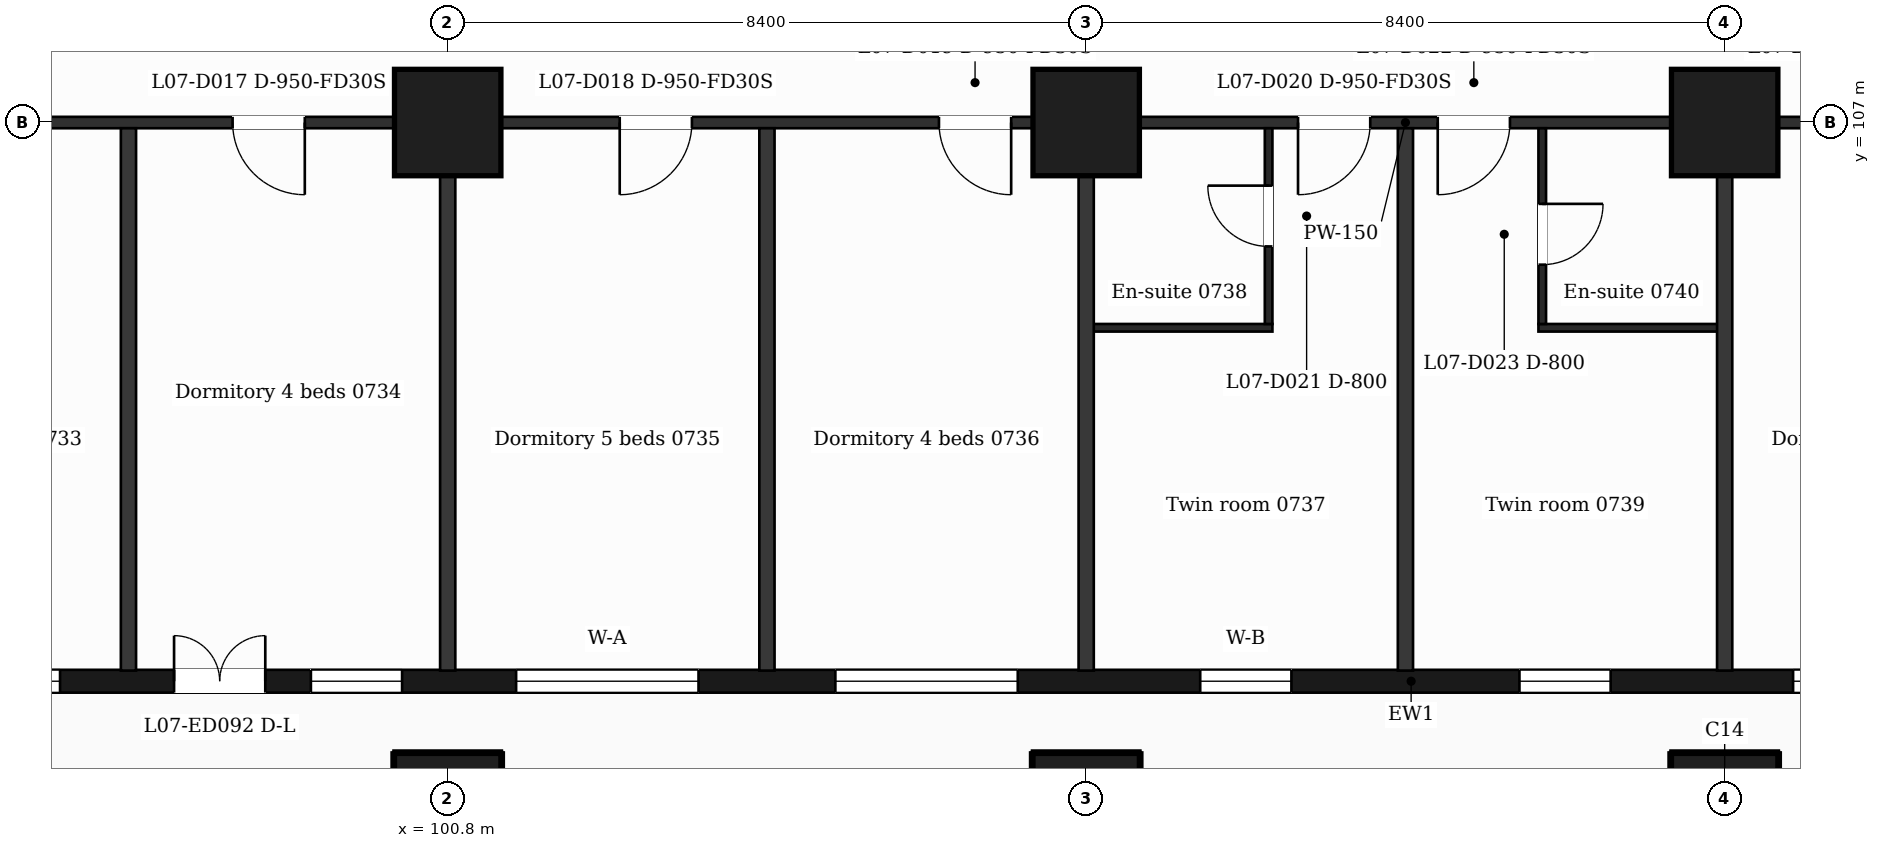
"""IFC4 building model, lengths in metres.
Left out: names, types, materials, properties, quantities, classifications, styles, units other than length and angle.
Written with IfcOpenShell. Run it as: python <this file> out.ifc"""

import sys

from ifc_helpers import new_model, si_unit, direction, frame, frame_2d, origin, origin_2d, place, context, subcontext, project, spatial, rectangle, extrude, element, fill, save


model = new_model("IFC4")
c1 = context("Model", 3, precision=1e-05, world=origin(), true_north=direction((0.0, 1.0)))
c2 = subcontext(c1, "Body", "Model", "MODEL_VIEW")
j1 = project(units=[si_unit("LENGTHUNIT", "METRE"), si_unit("PLANEANGLEUNIT", "RADIAN")], contexts=[c1])
p1 = place(None, origin())
s1 = spatial("IfcSite", under=j1, at=p1, CompositionType="ELEMENT")
p2 = place(p1, origin())
s2 = spatial("IfcBuilding", under=s1, at=p2, CompositionType="ELEMENT")
p3 = place(p2, frame((0.0, 0.0, 42.5)))
s3 = spatial("IfcBuildingStorey", under=s2, at=p3, CompositionType="ELEMENT", Elevation=42.5)
for number, where, z_axis, x_axis in (
    (1, (100.8, 98.0, 0.0), (0.0, 0.0, 1.0), (1.0, 0.0, 0.0)),
    (2, (109.2, 98.0, 0.0), (0.0, 0.0, 1.0), (1.0, 0.0, 0.0)),
    (3, (117.6, 98.0, 0.0), (0.0, 0.0, 1.0), (1.0, 0.0, 0.0)),
    (4, (100.8, 107.0, 0.0), (0.0, 0.0, 1.0), (1.0, 0.0, 0.0)),
    (5, (109.2, 107.0, 0.0), (0.0, 0.0, 1.0), (1.0, 0.0, 0.0)),
    (6, (117.6, 107.0, 0.0), (0.0, 0.0, 1.0), (1.0, 0.0, 0.0)),
):
    element("IfcColumn", number, at=place(p3, frame(where, z_axis=z_axis, x_axis=x_axis)), inside=s3, PredefinedType="COLUMN", context=c2, shape_type="SweptSolid", body=[
        extrude(rectangle(XDim=1.4, YDim=1.4, at=origin_2d()), origin(), (0.0, 0.0, 1.0), 3.5),
    ])
p4 = place(p3, frame((89.85, 99.65, 0.0), z_axis=(0.0, 0.0, 1.0), x_axis=(1.0, 0.0, 0.0)))
e7 = element("IfcWall", 7, at=p4, inside=s3, PredefinedType="SOLIDWALL", context=c2, shape_type="SweptSolid", body=[
    extrude(rectangle(XDim=47.25, YDim=0.3, at=frame_2d((23.625, 0.0))), origin(), (0.0, 0.0, 1.0), 3.18),
])
p5 = place(p4, frame((0.725, 0.0, 0.9)))
e8 = element("IfcOpeningElement", 8, at=p5, cuts=e7, PredefinedType="OPENING", context=c2, shape_type="SweptSolid", body=[
    extrude(rectangle(XDim=1.2, YDim=2.1, at=frame_2d((0.6, 1.05))), frame((0.0, 0.16, 0.0), z_axis=(0.0, -1.0, 0.0), x_axis=(1.0, 0.0, 0.0)), (0.0, 0.0, 1.0), 0.32),
])
p6 = place(p4, frame((3.45, 0.0, 0.9)))
e9 = element("IfcOpeningElement", 9, at=p6, cuts=e7, PredefinedType="OPENING", context=c2, shape_type="SweptSolid", body=[
    extrude(rectangle(XDim=2.4, YDim=2.1, at=frame_2d((1.2, 1.05))), frame((0.0, 0.16, 0.0), z_axis=(0.0, -1.0, 0.0), x_axis=(1.0, 0.0, 0.0)), (0.0, 0.0, 1.0), 0.32),
])
p7 = place(p4, frame((7.35, 0.0, 0.0)))
e10 = element("IfcOpeningElement", 10, at=p7, cuts=e7, PredefinedType="OPENING", context=c2, shape_type="SweptSolid", body=[
    extrude(rectangle(XDim=1.2, YDim=2.4, at=frame_2d((0.6, 1.2))), frame((0.0, 0.16, 0.0), z_axis=(0.0, -1.0, 0.0), x_axis=(1.0, 0.0, 0.0)), (0.0, 0.0, 1.0), 0.32),
])
p8 = place(p4, frame((9.15, 0.0, 0.9)))
e11 = element("IfcOpeningElement", 11, at=p8, cuts=e7, PredefinedType="OPENING", context=c2, shape_type="SweptSolid", body=[
    extrude(rectangle(XDim=1.2, YDim=2.1, at=frame_2d((0.6, 1.05))), frame((0.0, 0.16, 0.0), z_axis=(0.0, -1.0, 0.0), x_axis=(1.0, 0.0, 0.0)), (0.0, 0.0, 1.0), 0.32),
])
p9 = place(p4, frame((11.85, 0.0, 0.9)))
e12 = element("IfcOpeningElement", 12, at=p9, cuts=e7, PredefinedType="OPENING", context=c2, shape_type="SweptSolid", body=[
    extrude(rectangle(XDim=2.4, YDim=2.1, at=frame_2d((1.2, 1.05))), frame((0.0, 0.16, 0.0), z_axis=(0.0, -1.0, 0.0), x_axis=(1.0, 0.0, 0.0)), (0.0, 0.0, 1.0), 0.32),
])
p10 = place(p4, frame((16.05, 0.0, 0.9)))
e13 = element("IfcOpeningElement", 13, at=p10, cuts=e7, PredefinedType="OPENING", context=c2, shape_type="SweptSolid", body=[
    extrude(rectangle(XDim=2.4, YDim=2.1, at=frame_2d((1.2, 1.05))), frame((0.0, 0.16, 0.0), z_axis=(0.0, -1.0, 0.0), x_axis=(1.0, 0.0, 0.0)), (0.0, 0.0, 1.0), 0.32),
])
p11 = place(p4, frame((20.85, 0.0, 0.9)))
e14 = element("IfcOpeningElement", 14, at=p11, cuts=e7, PredefinedType="OPENING", context=c2, shape_type="SweptSolid", body=[
    extrude(rectangle(XDim=1.2, YDim=2.1, at=frame_2d((0.6, 1.05))), frame((0.0, 0.16, 0.0), z_axis=(0.0, -1.0, 0.0), x_axis=(1.0, 0.0, 0.0)), (0.0, 0.0, 1.0), 0.32),
])
p12 = place(p4, frame((25.05, 0.0, 0.9)))
e15 = element("IfcOpeningElement", 15, at=p12, cuts=e7, PredefinedType="OPENING", context=c2, shape_type="SweptSolid", body=[
    extrude(rectangle(XDim=1.2, YDim=2.1, at=frame_2d((0.6, 1.05))), frame((0.0, 0.16, 0.0), z_axis=(0.0, -1.0, 0.0), x_axis=(1.0, 0.0, 0.0)), (0.0, 0.0, 1.0), 0.32),
])
p13 = place(p4, frame((28.65, 0.0, 0.9)))
e16 = element("IfcOpeningElement", 16, at=p13, cuts=e7, PredefinedType="OPENING", context=c2, shape_type="SweptSolid", body=[
    extrude(rectangle(XDim=2.4, YDim=2.1, at=frame_2d((1.2, 1.05))), frame((0.0, 0.16, 0.0), z_axis=(0.0, -1.0, 0.0), x_axis=(1.0, 0.0, 0.0)), (0.0, 0.0, 1.0), 0.32),
])
p14 = place(p4, frame((32.85, 0.0, 0.9)))
e17 = element("IfcOpeningElement", 17, at=p14, cuts=e7, PredefinedType="OPENING", context=c2, shape_type="SweptSolid", body=[
    extrude(rectangle(XDim=2.4, YDim=2.1, at=frame_2d((1.2, 1.05))), frame((0.0, 0.16, 0.0), z_axis=(0.0, -1.0, 0.0), x_axis=(1.0, 0.0, 0.0)), (0.0, 0.0, 1.0), 0.32),
])
p15 = place(p4, frame((37.05, 0.0, 0.9)))
e18 = element("IfcOpeningElement", 18, at=p15, cuts=e7, PredefinedType="OPENING", context=c2, shape_type="SweptSolid", body=[
    extrude(rectangle(XDim=2.4, YDim=2.1, at=frame_2d((1.2, 1.05))), frame((0.0, 0.16, 0.0), z_axis=(0.0, -1.0, 0.0), x_axis=(1.0, 0.0, 0.0)), (0.0, 0.0, 1.0), 0.32),
])
p16 = place(p4, frame((41.25, 0.0, 0.9)))
e19 = element("IfcOpeningElement", 19, at=p16, cuts=e7, PredefinedType="OPENING", context=c2, shape_type="SweptSolid", body=[
    extrude(rectangle(XDim=2.4, YDim=2.1, at=frame_2d((1.2, 1.05))), frame((0.0, 0.16, 0.0), z_axis=(0.0, -1.0, 0.0), x_axis=(1.0, 0.0, 0.0)), (0.0, 0.0, 1.0), 0.32),
])
p17 = place(p4, frame((45.25, 0.0, 0.9)))
e20 = element("IfcOpeningElement", 20, at=p17, cuts=e7, PredefinedType="OPENING", context=c2, shape_type="SweptSolid", body=[
    extrude(rectangle(XDim=1.2, YDim=2.1, at=frame_2d((0.6, 1.05))), frame((0.0, 0.16, 0.0), z_axis=(0.0, -1.0, 0.0), x_axis=(1.0, 0.0, 0.0)), (0.0, 0.0, 1.0), 0.32),
])
p18 = place(p3, frame((109.2, 104.3, 0.0), z_axis=(0.0, 0.0, 1.0), x_axis=(1.0, 0.0, 0.0)))
e21 = element("IfcWall", 21, at=p18, inside=s3, PredefinedType="PARTITIONING", context=c2, shape_type="SweptSolid", body=[
    extrude(rectangle(XDim=2.45, YDim=0.1, at=frame_2d((1.225, 0.0))), origin(), (0.0, 0.0, 1.0), 3.18),
])
p19 = place(p3, frame((115.15, 104.3, 0.0), z_axis=(0.0, 0.0, 1.0), x_axis=(1.0, 0.0, 0.0)))
e22 = element("IfcWall", 22, at=p19, inside=s3, PredefinedType="PARTITIONING", context=c2, shape_type="SweptSolid", body=[
    extrude(rectangle(XDim=2.45, YDim=0.1, at=frame_2d((1.225, 0.0))), origin(), (0.0, 0.0, 1.0), 3.18),
])
p20 = place(p3, frame((87.018, 107.0, 0.0), z_axis=(0.0, 0.0, 1.0), x_axis=(1.0, 0.0, 0.0)))
e23 = element("IfcWall", 23, at=p20, inside=s3, PredefinedType="PARTITIONING", context=c2, shape_type="SweptSolid", body=[
    extrude(rectangle(XDim=52.765, YDim=0.15, at=frame_2d((26.382, 0.0))), origin(), (0.0, 0.0, 1.0), 3.18),
])
p21 = place(p20, frame((1.032, 0.0, 0.0)))
e24 = element("IfcOpeningElement", 24, at=p21, cuts=e23, PredefinedType="OPENING", context=c2, shape_type="SweptSolid", body=[
    extrude(rectangle(XDim=0.95, YDim=2.1, at=frame_2d((0.475, 1.05))), frame((0.0, 0.085, 0.0), z_axis=(0.0, -1.0, 0.0), x_axis=(1.0, 0.0, 0.0)), (0.0, 0.0, 1.0), 0.17),
])
p22 = place(p20, frame((6.369, 0.0, 0.0)))
e25 = element("IfcOpeningElement", 25, at=p22, cuts=e23, PredefinedType="OPENING", context=c2, shape_type="SweptSolid", body=[
    extrude(rectangle(XDim=0.95, YDim=2.1, at=frame_2d((0.475, 1.05))), frame((0.0, 0.085, 0.0), z_axis=(0.0, -1.0, 0.0), x_axis=(1.0, 0.0, 0.0)), (0.0, 0.0, 1.0), 0.17),
])
p23 = place(p20, frame((10.952, 0.0, 0.0)))
e26 = element("IfcOpeningElement", 26, at=p23, cuts=e23, PredefinedType="OPENING", context=c2, shape_type="SweptSolid", body=[
    extrude(rectangle(XDim=0.95, YDim=2.1, at=frame_2d((0.475, 1.05))), frame((0.0, 0.085, 0.0), z_axis=(0.0, -1.0, 0.0), x_axis=(1.0, 0.0, 0.0)), (0.0, 0.0, 1.0), 0.17),
])
p24 = place(p20, frame((16.045, 0.0, 0.0)))
e27 = element("IfcOpeningElement", 27, at=p24, cuts=e23, PredefinedType="OPENING", context=c2, shape_type="SweptSolid", body=[
    extrude(rectangle(XDim=0.95, YDim=2.1, at=frame_2d((0.475, 1.05))), frame((0.0, 0.085, 0.0), z_axis=(0.0, -1.0, 0.0), x_axis=(1.0, 0.0, 0.0)), (0.0, 0.0, 1.0), 0.17),
])
p25 = place(p20, frame((20.245, 0.0, 0.0)))
e28 = element("IfcOpeningElement", 28, at=p25, cuts=e23, PredefinedType="OPENING", context=c2, shape_type="SweptSolid", body=[
    extrude(rectangle(XDim=0.95, YDim=2.1, at=frame_2d((0.475, 1.05))), frame((0.0, 0.085, 0.0), z_axis=(0.0, -1.0, 0.0), x_axis=(1.0, 0.0, 0.0)), (0.0, 0.0, 1.0), 0.17),
])
p26 = place(p20, frame((24.969, 0.0, 0.0)))
e29 = element("IfcOpeningElement", 29, at=p26, cuts=e23, PredefinedType="OPENING", context=c2, shape_type="SweptSolid", body=[
    extrude(rectangle(XDim=0.95, YDim=2.1, at=frame_2d((0.475, 1.05))), frame((0.0, 0.085, 0.0), z_axis=(0.0, -1.0, 0.0), x_axis=(1.0, 0.0, 0.0)), (0.0, 0.0, 1.0), 0.17),
])
p27 = place(p20, frame((26.807, 0.0, 0.0)))
e30 = element("IfcOpeningElement", 30, at=p27, cuts=e23, PredefinedType="OPENING", context=c2, shape_type="SweptSolid", body=[
    extrude(rectangle(XDim=0.95, YDim=2.1, at=frame_2d((0.475, 1.05))), frame((0.0, 0.085, 0.0), z_axis=(0.0, -1.0, 0.0), x_axis=(1.0, 0.0, 0.0)), (0.0, 0.0, 1.0), 0.17),
])
p28 = place(p20, frame((31.952, 0.0, 0.0)))
e31 = element("IfcOpeningElement", 31, at=p28, cuts=e23, PredefinedType="OPENING", context=c2, shape_type="SweptSolid", body=[
    extrude(rectangle(XDim=0.95, YDim=2.1, at=frame_2d((0.475, 1.05))), frame((0.0, 0.085, 0.0), z_axis=(0.0, -1.0, 0.0), x_axis=(1.0, 0.0, 0.0)), (0.0, 0.0, 1.0), 0.17),
])
p29 = place(p20, frame((40.795, 0.0, 0.0)))
e32 = element("IfcOpeningElement", 32, at=p29, cuts=e23, PredefinedType="OPENING", context=c2, shape_type="SweptSolid", body=[
    extrude(rectangle(XDim=0.95, YDim=2.1, at=frame_2d((0.475, 1.05))), frame((0.0, 0.085, 0.0), z_axis=(0.0, -1.0, 0.0), x_axis=(1.0, 0.0, 0.0)), (0.0, 0.0, 1.0), 0.17),
])
p30 = place(p20, frame((43.644, 0.0, 0.0)))
e33 = element("IfcOpeningElement", 33, at=p30, cuts=e23, PredefinedType="OPENING", context=c2, shape_type="SweptSolid", body=[
    extrude(rectangle(XDim=0.95, YDim=2.1, at=frame_2d((0.475, 1.05))), frame((0.0, 0.085, 0.0), z_axis=(0.0, -1.0, 0.0), x_axis=(1.0, 0.0, 0.0)), (0.0, 0.0, 1.0), 0.17),
])
p31 = place(p20, frame((48.767, 0.0, 0.0)))
e34 = element("IfcOpeningElement", 34, at=p31, cuts=e23, PredefinedType="OPENING", context=c2, shape_type="SweptSolid", body=[
    extrude(rectangle(XDim=0.95, YDim=2.1, at=frame_2d((0.475, 1.05))), frame((0.0, 0.085, 0.0), z_axis=(0.0, -1.0, 0.0), x_axis=(1.0, 0.0, 0.0)), (0.0, 0.0, 1.0), 0.17),
])
for number, where, z_axis, x_axis in (
    (35, (96.6, 99.79, 0.0), (0.0, 0.0, 1.0), (0.0, 1.0, 0.0)),
    (36, (100.8, 99.79, 0.0), (0.0, 0.0, 1.0), (0.0, 1.0, 0.0)),
    (37, (105.0, 99.79, 0.0), (0.0, 0.0, 1.0), (0.0, 1.0, 0.0)),
    (38, (109.2, 99.79, 0.0), (0.0, 0.0, 1.0), (0.0, 1.0, 0.0)),
):
    element("IfcWall", number, at=place(p3, frame(where, z_axis=z_axis, x_axis=x_axis)), inside=s3, PredefinedType="PARTITIONING", context=c2, shape_type="SweptSolid", body=[
        extrude(rectangle(XDim=7.135, YDim=0.2, at=frame_2d((3.567, 0.0))), origin(), (0.0, 0.0, 1.0), 3.18),
    ])
p32 = place(p3, frame((111.6, 104.35, 0.0), z_axis=(0.0, 0.0, 1.0), x_axis=(0.0, 1.0, 0.0)))
e39 = element("IfcWall", 39, at=p32, inside=s3, PredefinedType="PARTITIONING", context=c2, shape_type="SweptSolid", body=[
    extrude(rectangle(XDim=2.575, YDim=0.1, at=frame_2d((1.288, 0.0))), origin(), (0.0, 0.0, 1.0), 3.18),
])
p33 = place(p32, frame((1.02, 0.0, 0.0)))
e40 = element("IfcOpeningElement", 40, at=p33, cuts=e39, PredefinedType="OPENING", context=c2, shape_type="SweptSolid", body=[
    extrude(rectangle(XDim=0.8, YDim=2.1, at=frame_2d((0.4, 1.05))), frame((0.0, 0.06, 0.0), z_axis=(0.0, -1.0, 0.0), x_axis=(1.0, 0.0, 0.0)), (0.0, 0.0, 1.0), 0.12),
])
p34 = place(p3, frame((113.4, 99.79, 0.0), z_axis=(0.0, 0.0, 1.0), x_axis=(0.0, 1.0, 0.0)))
e41 = element("IfcWall", 41, at=p34, inside=s3, PredefinedType="PARTITIONING", context=c2, shape_type="SweptSolid", body=[
    extrude(rectangle(XDim=7.135, YDim=0.2, at=frame_2d((3.567, 0.0))), origin(), (0.0, 0.0, 1.0), 3.18),
])
p35 = place(p3, frame((115.2, 104.35, 0.0), z_axis=(0.0, 0.0, 1.0), x_axis=(0.0, 1.0, 0.0)))
e42 = element("IfcWall", 42, at=p35, inside=s3, PredefinedType="PARTITIONING", context=c2, shape_type="SweptSolid", body=[
    extrude(rectangle(XDim=2.575, YDim=0.1, at=frame_2d((1.288, 0.0))), origin(), (0.0, 0.0, 1.0), 3.18),
])
p36 = place(p35, frame((0.78, 0.0, 0.0)))
e43 = element("IfcOpeningElement", 43, at=p36, cuts=e42, PredefinedType="OPENING", context=c2, shape_type="SweptSolid", body=[
    extrude(rectangle(XDim=0.8, YDim=2.1, at=frame_2d((0.4, 1.05))), frame((0.0, 0.06, 0.0), z_axis=(0.0, -1.0, 0.0), x_axis=(1.0, 0.0, 0.0)), (0.0, 0.0, 1.0), 0.12),
])
p37 = place(p3, frame((117.6, 99.79, 0.0), z_axis=(0.0, 0.0, 1.0), x_axis=(0.0, 1.0, 0.0)))
e44 = element("IfcWall", 44, at=p37, inside=s3, PredefinedType="PARTITIONING", context=c2, shape_type="SweptSolid", body=[
    extrude(rectangle(XDim=7.135, YDim=0.2, at=frame_2d((3.567, 0.0))), origin(), (0.0, 0.0, 1.0), 3.18),
])
p38 = place(p6, origin())
e45 = element("IfcWindow", 45, at=p38, inside=s3, PartitioningType="SINGLE_PANEL", PredefinedType="WINDOW", context=c2, shape_type="SweptSolid", body=[
    extrude(rectangle(XDim=2.4, YDim=2.1, at=frame_2d((1.2, 1.05))), frame((0.0, 0.03, 0.0), z_axis=(0.0, -1.0, 0.0), x_axis=(1.0, 0.0, 0.0)), (0.0, 0.0, 1.0), 0.06),
])
fill(e9, e45)
p39 = place(p7, origin())
e46 = element("IfcDoor", 46, at=p39, inside=s3, OperationType="DOUBLE_DOOR_SINGLE_SWING", PredefinedType="DOOR", context=c2, shape_type="SweptSolid", body=[
    extrude(rectangle(XDim=1.2, YDim=2.4, at=frame_2d((0.6, 1.2))), frame((0.0, 0.025, 0.0), z_axis=(0.0, -1.0, 0.0), x_axis=(1.0, 0.0, 0.0)), (0.0, 0.0, 1.0), 0.05),
])
fill(e10, e46)
p40 = place(p8, origin())
e47 = element("IfcWindow", 47, at=p40, inside=s3, PartitioningType="SINGLE_PANEL", PredefinedType="WINDOW", context=c2, shape_type="SweptSolid", body=[
    extrude(rectangle(XDim=1.2, YDim=2.1, at=frame_2d((0.6, 1.05))), frame((0.0, 0.03, 0.0), z_axis=(0.0, -1.0, 0.0), x_axis=(1.0, 0.0, 0.0)), (0.0, 0.0, 1.0), 0.06),
])
fill(e11, e47)
p41 = place(p9, origin())
e48 = element("IfcWindow", 48, at=p41, inside=s3, PartitioningType="SINGLE_PANEL", PredefinedType="WINDOW", context=c2, shape_type="SweptSolid", body=[
    extrude(rectangle(XDim=2.4, YDim=2.1, at=frame_2d((1.2, 1.05))), frame((0.0, 0.03, 0.0), z_axis=(0.0, -1.0, 0.0), x_axis=(1.0, 0.0, 0.0)), (0.0, 0.0, 1.0), 0.06),
])
fill(e12, e48)
p42 = place(p10, origin())
e49 = element("IfcWindow", 49, at=p42, inside=s3, PartitioningType="SINGLE_PANEL", PredefinedType="WINDOW", context=c2, shape_type="SweptSolid", body=[
    extrude(rectangle(XDim=2.4, YDim=2.1, at=frame_2d((1.2, 1.05))), frame((0.0, 0.03, 0.0), z_axis=(0.0, -1.0, 0.0), x_axis=(1.0, 0.0, 0.0)), (0.0, 0.0, 1.0), 0.06),
])
fill(e13, e49)
p43 = place(p11, origin())
e50 = element("IfcWindow", 50, at=p43, inside=s3, PartitioningType="SINGLE_PANEL", PredefinedType="WINDOW", context=c2, shape_type="SweptSolid", body=[
    extrude(rectangle(XDim=1.2, YDim=2.1, at=frame_2d((0.6, 1.05))), frame((0.0, 0.03, 0.0), z_axis=(0.0, -1.0, 0.0), x_axis=(1.0, 0.0, 0.0)), (0.0, 0.0, 1.0), 0.06),
])
fill(e14, e50)
p44 = place(p12, origin())
e51 = element("IfcWindow", 51, at=p44, inside=s3, PartitioningType="SINGLE_PANEL", PredefinedType="WINDOW", context=c2, shape_type="SweptSolid", body=[
    extrude(rectangle(XDim=1.2, YDim=2.1, at=frame_2d((0.6, 1.05))), frame((0.0, 0.03, 0.0), z_axis=(0.0, -1.0, 0.0), x_axis=(1.0, 0.0, 0.0)), (0.0, 0.0, 1.0), 0.06),
])
fill(e15, e51)
p45 = place(p13, origin())
e52 = element("IfcWindow", 52, at=p45, inside=s3, PartitioningType="SINGLE_PANEL", PredefinedType="WINDOW", context=c2, shape_type="SweptSolid", body=[
    extrude(rectangle(XDim=2.4, YDim=2.1, at=frame_2d((1.2, 1.05))), frame((0.0, 0.03, 0.0), z_axis=(0.0, -1.0, 0.0), x_axis=(1.0, 0.0, 0.0)), (0.0, 0.0, 1.0), 0.06),
])
fill(e16, e52)
p46 = place(p23, origin())
e53 = element("IfcDoor", 53, at=p46, inside=s3, OperationType="SINGLE_SWING_RIGHT", PredefinedType="DOOR", context=c2, shape_type="SweptSolid", body=[
    extrude(rectangle(XDim=0.95, YDim=2.1, at=frame_2d((0.475, 1.05))), frame((0.0, 0.025, 0.0), z_axis=(0.0, -1.0, 0.0), x_axis=(1.0, 0.0, 0.0)), (0.0, 0.0, 1.0), 0.05),
])
fill(e26, e53)
p47 = place(p24, origin())
e54 = element("IfcDoor", 54, at=p47, inside=s3, OperationType="SINGLE_SWING_LEFT", PredefinedType="DOOR", context=c2, shape_type="SweptSolid", body=[
    extrude(rectangle(XDim=0.95, YDim=2.1, at=frame_2d((0.475, 1.05))), frame((0.0, 0.025, 0.0), z_axis=(0.0, -1.0, 0.0), x_axis=(1.0, 0.0, 0.0)), (0.0, 0.0, 1.0), 0.05),
])
fill(e27, e54)
p48 = place(p25, origin())
e55 = element("IfcDoor", 55, at=p48, inside=s3, OperationType="SINGLE_SWING_RIGHT", PredefinedType="DOOR", context=c2, shape_type="SweptSolid", body=[
    extrude(rectangle(XDim=0.95, YDim=2.1, at=frame_2d((0.475, 1.05))), frame((0.0, 0.025, 0.0), z_axis=(0.0, -1.0, 0.0), x_axis=(1.0, 0.0, 0.0)), (0.0, 0.0, 1.0), 0.05),
])
fill(e28, e55)
p49 = place(p26, origin())
e56 = element("IfcDoor", 56, at=p49, inside=s3, OperationType="SINGLE_SWING_LEFT", PredefinedType="DOOR", context=c2, shape_type="SweptSolid", body=[
    extrude(rectangle(XDim=0.95, YDim=2.1, at=frame_2d((0.475, 1.05))), frame((0.0, 0.025, 0.0), z_axis=(0.0, -1.0, 0.0), x_axis=(1.0, 0.0, 0.0)), (0.0, 0.0, 1.0), 0.05),
])
fill(e29, e56)
p50 = place(p33, origin())
e57 = element("IfcDoor", 57, at=p50, inside=s3, OperationType="SINGLE_SWING_RIGHT", PredefinedType="DOOR", context=c2, shape_type="SweptSolid", body=[
    extrude(rectangle(XDim=0.8, YDim=2.1, at=frame_2d((0.4, 1.05))), frame((0.0, 0.025, 0.0), z_axis=(0.0, -1.0, 0.0), x_axis=(1.0, 0.0, 0.0)), (0.0, 0.0, 1.0), 0.05),
])
fill(e40, e57)
p51 = place(p27, origin())
e58 = element("IfcDoor", 58, at=p51, inside=s3, OperationType="SINGLE_SWING_LEFT", PredefinedType="DOOR", context=c2, shape_type="SweptSolid", body=[
    extrude(rectangle(XDim=0.95, YDim=2.1, at=frame_2d((0.475, 1.05))), frame((0.0, 0.025, 0.0), z_axis=(0.0, -1.0, 0.0), x_axis=(1.0, 0.0, 0.0)), (0.0, 0.0, 1.0), 0.05),
])
fill(e30, e58)
p52 = place(p36, origin())
e59 = element("IfcDoor", 59, at=p52, inside=s3, OperationType="SINGLE_SWING_RIGHT", PredefinedType="DOOR", context=c2, shape_type="SweptSolid", body=[
    extrude(rectangle(XDim=0.8, YDim=2.1, at=frame_2d((0.4, 1.05))), frame((0.0, 0.025, 0.0), z_axis=(0.0, -1.0, 0.0), x_axis=(1.0, 0.0, 0.0)), (0.0, 0.0, 1.0), 0.05),
])
fill(e43, e59)
save(model, sys.argv[1])
